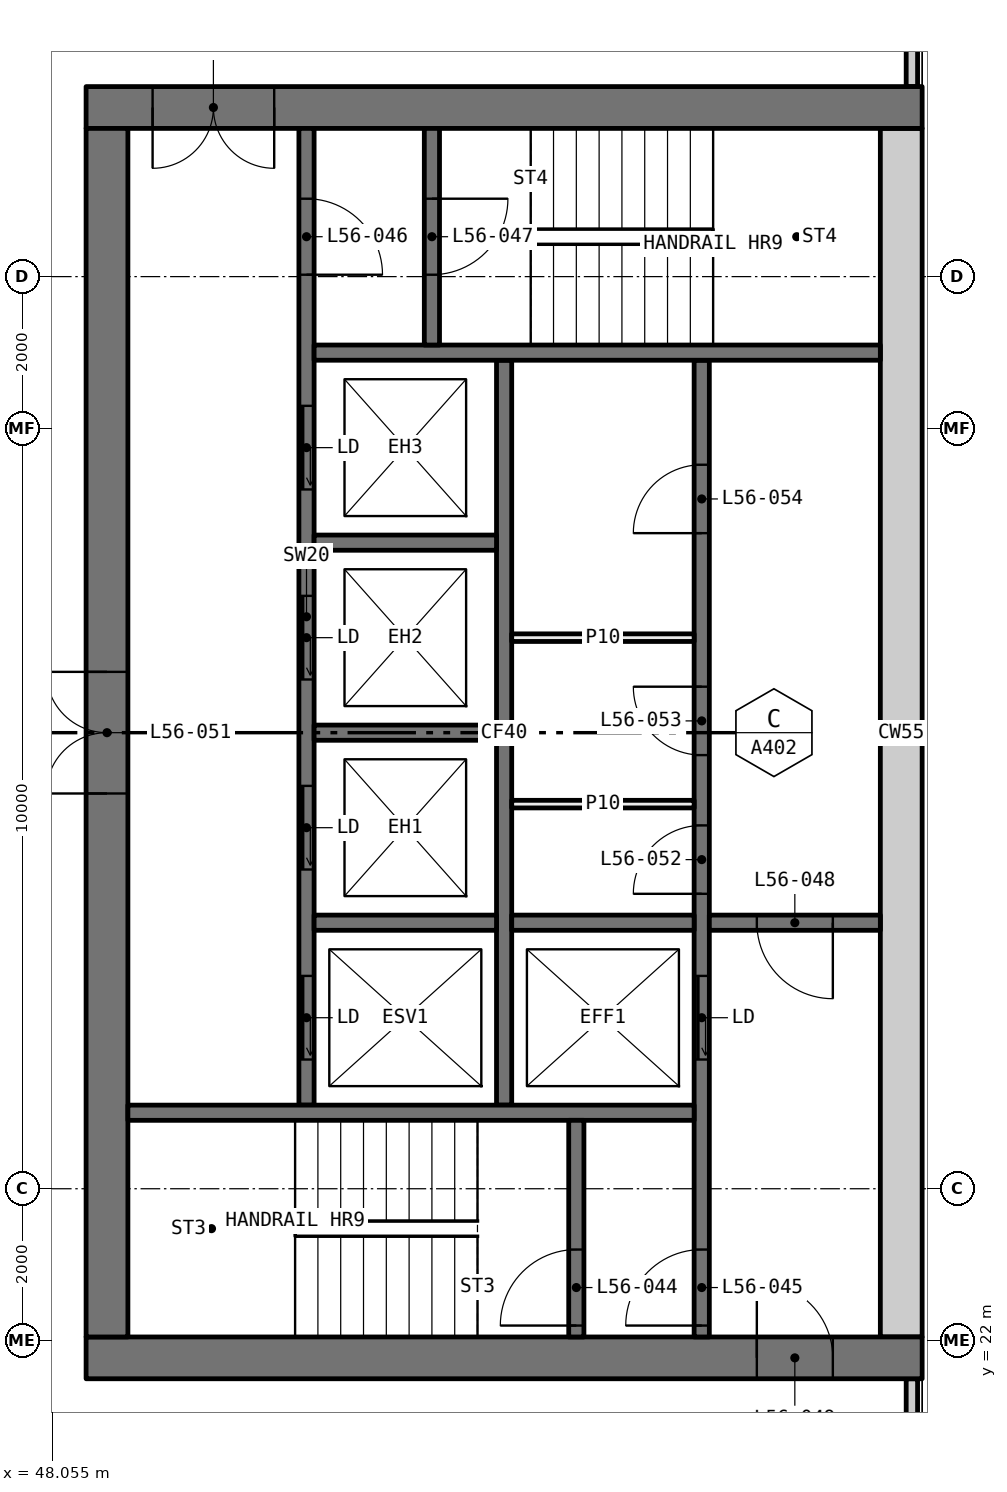
"""IFC4 building model, lengths in metres.
Left out: names, types, materials, properties, quantities, classifications, styles, units other than length and angle.
Written with IfcOpenShell. Run it as: python <this file> out.ifc"""

import sys

from ifc_helpers import new_model, si_unit, direction, frame, frame_2d, origin, place, context, subcontext, project, spatial, rectangle, extrude, element, fill, save


model = new_model("IFC4")
c1 = context("Model", 3, precision=1e-05, world=origin(), true_north=direction((0.0, 1.0)))
c2 = subcontext(c1, "Body", "Model", "MODEL_VIEW")
j1 = project(units=[si_unit("LENGTHUNIT", "METRE"), si_unit("PLANEANGLEUNIT", "RADIAN")], contexts=[c1])
p1 = place(None, origin())
s1 = spatial("IfcSite", under=j1, at=p1, CompositionType="ELEMENT")
p2 = place(p1, origin())
s2 = spatial("IfcBuilding", under=s1, at=p2, CompositionType="ELEMENT")
p3 = place(p2, frame((0.0, 0.0, 210.0)))
s3 = spatial("IfcBuildingStorey", under=s2, at=p3, CompositionType="ELEMENT", Elevation=210.0)
for number, where, z_axis, x_axis in (
    (1, (59.365, 18.71, 0.0), (0.0, 0.0, 1.0), (0.0, 1.0, 0.0)),
    (2, (59.365, 38.5, 0.0), (0.0, 0.0, 1.0), (0.0, 1.0, 0.0)),
):
    element("IfcWall", number, at=place(p3, frame(where, z_axis=z_axis, x_axis=x_axis)), inside=s3, PredefinedType="ELEMENTEDWALL", context=c2, shape_type="SweptSolid", body=[
        extrude(rectangle(XDim=2.79, YDim=0.15, at=frame_2d((1.395, 0.0))), origin(), (0.0, 0.0, 1.0), 3.05),
    ])
p4 = place(p3, frame((59.5, 21.775, 0.0), z_axis=(0.0, 0.0, 1.0), x_axis=(-1.0, 0.0, 0.0)))
e3 = element("IfcWall", 3, at=p4, inside=s3, PredefinedType="SHEAR", context=c2, shape_type="SweptSolid", body=[
    extrude(rectangle(XDim=11.0, YDim=0.55, at=frame_2d((5.5, 0.0))), origin(), (0.0, 0.0, 1.0), 3.05),
])
p5 = place(p4, frame((1.175, 0.0, 0.0)))
e4 = element("IfcOpeningElement", 4, at=p5, cuts=e3, PredefinedType="OPENING", context=c2, shape_type="SweptSolid", body=[
    extrude(rectangle(XDim=1.0, YDim=2.1, at=frame_2d((0.5, 1.05))), frame((0.0, 0.285, 0.0), z_axis=(0.0, -1.0, 0.0), x_axis=(1.0, 0.0, 0.0)), (0.0, 0.0, 1.0), 0.57),
])
p6 = place(p3, frame((59.5, 38.225, 0.0), z_axis=(0.0, 0.0, 1.0), x_axis=(-1.0, 0.0, 0.0)))
e5 = element("IfcWall", 5, at=p6, inside=s3, PredefinedType="SHEAR", context=c2, shape_type="SweptSolid", body=[
    extrude(rectangle(XDim=11.0, YDim=0.55, at=frame_2d((5.5, 0.0))), origin(), (0.0, 0.0, 1.0), 3.05),
])
p7 = place(p6, frame((8.525, 0.0, 0.0)))
e6 = element("IfcOpeningElement", 6, at=p7, cuts=e5, PredefinedType="OPENING", context=c2, shape_type="SweptSolid", body=[
    extrude(rectangle(XDim=1.6, YDim=2.1, at=frame_2d((0.8, 1.05))), frame((0.0, 0.285, 0.0), z_axis=(0.0, -1.0, 0.0), x_axis=(1.0, 0.0, 0.0)), (0.0, 0.0, 1.0), 0.57),
])
p8 = place(p3, frame((59.225, 22.05, 0.0), z_axis=(0.0, 0.0, 1.0), x_axis=(0.0, 1.0, 0.0)))
e7 = element("IfcWall", 7, at=p8, inside=s3, PredefinedType="SHEAR", context=c2, shape_type="SweptSolid", body=[
    extrude(rectangle(XDim=15.9, YDim=0.55, at=frame_2d((7.95, 0.0))), origin(), (0.0, 0.0, 1.0), 3.05),
])
p9 = place(p3, frame((48.775, 22.05, 0.0), z_axis=(0.0, 0.0, 1.0), x_axis=(0.0, 1.0, 0.0)))
e8 = element("IfcWall", 8, at=p9, inside=s3, PredefinedType="SHEAR", context=c2, shape_type="SweptSolid", body=[
    extrude(rectangle(XDim=15.9, YDim=0.55, at=frame_2d((7.95, 0.0))), origin(), (0.0, 0.0, 1.0), 3.05),
])
p10 = place(p9, frame((7.15, 0.0, 0.0)))
e9 = element("IfcOpeningElement", 9, at=p10, cuts=e8, PredefinedType="OPENING", context=c2, shape_type="SweptSolid", body=[
    extrude(rectangle(XDim=1.6, YDim=2.1, at=frame_2d((0.8, 1.05))), frame((0.0, 0.285, 0.0), z_axis=(0.0, -1.0, 0.0), x_axis=(1.0, 0.0, 0.0)), (0.0, 0.0, 1.0), 0.57),
])
p11 = place(p3, frame((56.6, 22.05, 0.0), z_axis=(0.0, 0.0, 1.0), x_axis=(0.0, 1.0, 0.0)))
e10 = element("IfcWall", 10, at=p11, inside=s3, PredefinedType="SOLIDWALL", context=c2, shape_type="SweptSolid", body=[
    extrude(rectangle(XDim=12.85, YDim=0.2, at=frame_2d((6.425, 0.0))), origin(), (0.0, 0.0, 1.0), 3.05),
])
p12 = place(p11, frame((3.65, 0.0, 0.0)))
e11 = element("IfcOpeningElement", 11, at=p12, cuts=e10, PredefinedType="OPENING", context=c2, shape_type="SweptSolid", body=[
    extrude(rectangle(XDim=1.1, YDim=2.1, at=frame_2d((0.55, 1.05))), frame((0.0, 0.11, 0.0), z_axis=(0.0, -1.0, 0.0), x_axis=(1.0, 0.0, 0.0)), (0.0, 0.0, 1.0), 0.22),
])
p13 = place(p11, frame((0.15, 0.0, 0.0)))
e12 = element("IfcOpeningElement", 12, at=p13, cuts=e10, PredefinedType="OPENING", context=c2, shape_type="SweptSolid", body=[
    extrude(rectangle(XDim=1.0, YDim=2.1, at=frame_2d((0.5, 1.05))), frame((0.0, 0.11, 0.0), z_axis=(0.0, -1.0, 0.0), x_axis=(1.0, 0.0, 0.0)), (0.0, 0.0, 1.0), 0.22),
])
p14 = place(p11, frame((5.83, 0.0, 0.0)))
e13 = element("IfcOpeningElement", 13, at=p14, cuts=e10, PredefinedType="OPENING", context=c2, shape_type="SweptSolid", body=[
    extrude(rectangle(XDim=0.9, YDim=2.1, at=frame_2d((0.45, 1.05))), frame((0.0, 0.11, 0.0), z_axis=(0.0, -1.0, 0.0), x_axis=(1.0, 0.0, 0.0)), (0.0, 0.0, 1.0), 0.22),
])
p15 = place(p11, frame((7.655, 0.0, 0.0)))
e14 = element("IfcOpeningElement", 14, at=p15, cuts=e10, PredefinedType="OPENING", context=c2, shape_type="SweptSolid", body=[
    extrude(rectangle(XDim=0.9, YDim=2.1, at=frame_2d((0.45, 1.05))), frame((0.0, 0.11, 0.0), z_axis=(0.0, -1.0, 0.0), x_axis=(1.0, 0.0, 0.0)), (0.0, 0.0, 1.0), 0.22),
])
p16 = place(p11, frame((10.575, 0.0, 0.0)))
e15 = element("IfcOpeningElement", 15, at=p16, cuts=e10, PredefinedType="OPENING", context=c2, shape_type="SweptSolid", body=[
    extrude(rectangle(XDim=0.9, YDim=2.1, at=frame_2d((0.45, 1.05))), frame((0.0, 0.11, 0.0), z_axis=(0.0, -1.0, 0.0), x_axis=(1.0, 0.0, 0.0)), (0.0, 0.0, 1.0), 0.22),
])
p17 = place(p3, frame((51.4, 25.1, 0.0), z_axis=(0.0, 0.0, 1.0), x_axis=(0.0, 1.0, 0.0)))
e16 = element("IfcWall", 16, at=p17, inside=s3, PredefinedType="SOLIDWALL", context=c2, shape_type="SweptSolid", body=[
    extrude(rectangle(XDim=12.85, YDim=0.2, at=frame_2d((6.425, 0.0))), origin(), (0.0, 0.0, 1.0), 3.05),
])
p18 = place(p17, frame((0.6, 0.0, 0.0)))
e17 = element("IfcOpeningElement", 17, at=p18, cuts=e16, PredefinedType="OPENING", context=c2, shape_type="SweptSolid", body=[
    extrude(rectangle(XDim=1.1, YDim=2.1, at=frame_2d((0.55, 1.05))), frame((0.0, 0.11, 0.0), z_axis=(0.0, -1.0, 0.0), x_axis=(1.0, 0.0, 0.0)), (0.0, 0.0, 1.0), 0.22),
])
p19 = place(p17, frame((3.1, 0.0, 0.0)))
e18 = element("IfcOpeningElement", 18, at=p19, cuts=e16, PredefinedType="OPENING", context=c2, shape_type="SweptSolid", body=[
    extrude(rectangle(XDim=1.1, YDim=2.1, at=frame_2d((0.55, 1.05))), frame((0.0, 0.11, 0.0), z_axis=(0.0, -1.0, 0.0), x_axis=(1.0, 0.0, 0.0)), (0.0, 0.0, 1.0), 0.22),
])
p20 = place(p17, frame((5.6, 0.0, 0.0)))
e19 = element("IfcOpeningElement", 19, at=p20, cuts=e16, PredefinedType="OPENING", context=c2, shape_type="SweptSolid", body=[
    extrude(rectangle(XDim=1.1, YDim=2.1, at=frame_2d((0.55, 1.05))), frame((0.0, 0.11, 0.0), z_axis=(0.0, -1.0, 0.0), x_axis=(1.0, 0.0, 0.0)), (0.0, 0.0, 1.0), 0.22),
])
p21 = place(p17, frame((8.1, 0.0, 0.0)))
e20 = element("IfcOpeningElement", 20, at=p21, cuts=e16, PredefinedType="OPENING", context=c2, shape_type="SweptSolid", body=[
    extrude(rectangle(XDim=1.1, YDim=2.1, at=frame_2d((0.55, 1.05))), frame((0.0, 0.11, 0.0), z_axis=(0.0, -1.0, 0.0), x_axis=(1.0, 0.0, 0.0)), (0.0, 0.0, 1.0), 0.22),
])
p22 = place(p17, frame((10.925, 0.0, 0.0)))
e21 = element("IfcOpeningElement", 21, at=p22, cuts=e16, PredefinedType="OPENING", context=c2, shape_type="SweptSolid", body=[
    extrude(rectangle(XDim=1.0, YDim=2.1, at=frame_2d((0.5, 1.05))), frame((0.0, 0.11, 0.0), z_axis=(0.0, -1.0, 0.0), x_axis=(1.0, 0.0, 0.0)), (0.0, 0.0, 1.0), 0.22),
])
p23 = place(p3, frame((54.0, 25.1, 0.0), z_axis=(0.0, 0.0, 1.0), x_axis=(0.0, 1.0, 0.0)))
e22 = element("IfcWall", 22, at=p23, inside=s3, PredefinedType="SOLIDWALL", context=c2, shape_type="SweptSolid", body=[
    extrude(rectangle(XDim=9.8, YDim=0.2, at=frame_2d((4.9, 0.0))), origin(), (0.0, 0.0, 1.0), 3.05),
])
for number, where, z_axis, x_axis in (
    (23, (56.5, 25.0, 0.0), (0.0, 0.0, 1.0), (-1.0, 0.0, 0.0)),
    (24, (58.95, 35.0, 0.0), (0.0, 0.0, 1.0), (-1.0, 0.0, 0.0)),
):
    element("IfcWall", number, at=place(p3, frame(where, z_axis=z_axis, x_axis=x_axis)), inside=s3, PredefinedType="SOLIDWALL", context=c2, shape_type="SweptSolid", body=[
        extrude(rectangle(XDim=7.45, YDim=0.2, at=frame_2d((3.725, 0.0))), origin(), (0.0, 0.0, 1.0), 3.05),
    ])
p24 = place(p3, frame((58.95, 27.5, 0.0), z_axis=(0.0, 0.0, 1.0), x_axis=(-1.0, 0.0, 0.0)))
e25 = element("IfcWall", 25, at=p24, inside=s3, PredefinedType="SOLIDWALL", context=c2, shape_type="SweptSolid", body=[
    extrude(rectangle(XDim=2.25, YDim=0.2, at=frame_2d((1.125, 0.0))), origin(), (0.0, 0.0, 1.0), 3.05),
])
p25 = place(p24, frame((0.625, 0.0, 0.0)))
e26 = element("IfcOpeningElement", 26, at=p25, cuts=e25, PredefinedType="OPENING", context=c2, shape_type="SweptSolid", body=[
    extrude(rectangle(XDim=1.0, YDim=2.1, at=frame_2d((0.5, 1.05))), frame((0.0, 0.11, 0.0), z_axis=(0.0, -1.0, 0.0), x_axis=(1.0, 0.0, 0.0)), (0.0, 0.0, 1.0), 0.22),
])
p26 = place(p3, frame((54.95, 22.05, 0.0), z_axis=(0.0, 0.0, 1.0), x_axis=(0.0, 1.0, 0.0)))
e27 = element("IfcWall", 27, at=p26, inside=s3, PredefinedType="SOLIDWALL", context=c2, shape_type="SweptSolid", body=[
    extrude(rectangle(XDim=2.85, YDim=0.2, at=frame_2d((1.425, 0.0))), origin(), (0.0, 0.0, 1.0), 3.05),
])
p27 = place(p26, frame((0.15, 0.0, 0.0)))
e28 = element("IfcOpeningElement", 28, at=p27, cuts=e27, PredefinedType="OPENING", context=c2, shape_type="SweptSolid", body=[
    extrude(rectangle(XDim=1.0, YDim=2.1, at=frame_2d((0.5, 1.05))), frame((0.0, 0.11, 0.0), z_axis=(0.0, -1.0, 0.0), x_axis=(1.0, 0.0, 0.0)), (0.0, 0.0, 1.0), 0.22),
])
p28 = place(p3, frame((53.05, 35.1, 0.0), z_axis=(0.0, 0.0, 1.0), x_axis=(0.0, 1.0, 0.0)))
e29 = element("IfcWall", 29, at=p28, inside=s3, PredefinedType="SOLIDWALL", context=c2, shape_type="SweptSolid", body=[
    extrude(rectangle(XDim=2.85, YDim=0.2, at=frame_2d((1.425, 0.0))), origin(), (0.0, 0.0, 1.0), 3.05),
])
p29 = place(p28, frame((0.925, 0.0, 0.0)))
e30 = element("IfcOpeningElement", 30, at=p29, cuts=e29, PredefinedType="OPENING", context=c2, shape_type="SweptSolid", body=[
    extrude(rectangle(XDim=1.0, YDim=2.1, at=frame_2d((0.5, 1.05))), frame((0.0, 0.11, 0.0), z_axis=(0.0, -1.0, 0.0), x_axis=(1.0, 0.0, 0.0)), (0.0, 0.0, 1.0), 0.22),
])
for number, where, z_axis, x_axis in (
    (31, (56.5, 27.5, 0.0), (0.0, 0.0, 1.0), (-1.0, 0.0, 0.0)),
    (32, (53.9, 27.5, 0.0), (0.0, 0.0, 1.0), (-1.0, 0.0, 0.0)),
    (33, (53.9, 30.0, 0.0), (0.0, 0.0, 1.0), (-1.0, 0.0, 0.0)),
    (34, (53.9, 32.5, 0.0), (0.0, 0.0, 1.0), (-1.0, 0.0, 0.0)),
):
    element("IfcWall", number, at=place(p3, frame(where, z_axis=z_axis, x_axis=x_axis)), inside=s3, PredefinedType="SOLIDWALL", context=c2, shape_type="SweptSolid", body=[
        extrude(rectangle(XDim=2.4, YDim=0.2, at=frame_2d((1.2, 0.0))), origin(), (0.0, 0.0, 1.0), 3.05),
    ])
for number, where, z_axis, x_axis in (
    (35, (56.5, 29.06, 0.0), (0.0, 0.0, 1.0), (-1.0, 0.0, 0.0)),
    (36, (56.5, 31.25, 0.0), (0.0, 0.0, 1.0), (-1.0, 0.0, 0.0)),
):
    element("IfcWall", number, at=place(p3, frame(where, z_axis=z_axis, x_axis=x_axis)), inside=s3, PredefinedType="PARTITIONING", context=c2, shape_type="SweptSolid", body=[
        extrude(rectangle(XDim=2.4, YDim=0.1, at=frame_2d((1.2, 0.0))), origin(), (0.0, 0.0, 1.0), 3.05),
    ])
p30 = place(p18, origin())
e37 = element("IfcDoor", 37, at=p30, inside=s3, OperationType="SLIDING_TO_LEFT", PredefinedType="DOOR", context=c2, shape_type="SweptSolid", body=[
    extrude(rectangle(XDim=1.1, YDim=2.1, at=frame_2d((0.55, 1.05))), frame((0.0, 0.025, 0.0), z_axis=(0.0, -1.0, 0.0), x_axis=(1.0, 0.0, 0.0)), (0.0, 0.0, 1.0), 0.05),
])
fill(e17, e37)
p31 = place(p19, origin())
e38 = element("IfcDoor", 38, at=p31, inside=s3, OperationType="SLIDING_TO_LEFT", PredefinedType="DOOR", context=c2, shape_type="SweptSolid", body=[
    extrude(rectangle(XDim=1.1, YDim=2.1, at=frame_2d((0.55, 1.05))), frame((0.0, 0.025, 0.0), z_axis=(0.0, -1.0, 0.0), x_axis=(1.0, 0.0, 0.0)), (0.0, 0.0, 1.0), 0.05),
])
fill(e18, e38)
p32 = place(p20, origin())
e39 = element("IfcDoor", 39, at=p32, inside=s3, OperationType="SLIDING_TO_LEFT", PredefinedType="DOOR", context=c2, shape_type="SweptSolid", body=[
    extrude(rectangle(XDim=1.1, YDim=2.1, at=frame_2d((0.55, 1.05))), frame((0.0, 0.025, 0.0), z_axis=(0.0, -1.0, 0.0), x_axis=(1.0, 0.0, 0.0)), (0.0, 0.0, 1.0), 0.05),
])
fill(e19, e39)
p33 = place(p21, origin())
e40 = element("IfcDoor", 40, at=p33, inside=s3, OperationType="SLIDING_TO_LEFT", PredefinedType="DOOR", context=c2, shape_type="SweptSolid", body=[
    extrude(rectangle(XDim=1.1, YDim=2.1, at=frame_2d((0.55, 1.05))), frame((0.0, 0.025, 0.0), z_axis=(0.0, -1.0, 0.0), x_axis=(1.0, 0.0, 0.0)), (0.0, 0.0, 1.0), 0.05),
])
fill(e20, e40)
p34 = place(p12, origin())
e41 = element("IfcDoor", 41, at=p34, inside=s3, OperationType="SLIDING_TO_LEFT", PredefinedType="DOOR", context=c2, shape_type="SweptSolid", body=[
    extrude(rectangle(XDim=1.1, YDim=2.1, at=frame_2d((0.55, 1.05))), frame((0.0, 0.025, 0.0), z_axis=(0.0, -1.0, 0.0), x_axis=(1.0, 0.0, 0.0)), (0.0, 0.0, 1.0), 0.05),
])
fill(e11, e41)
p35 = place(p27, origin())
e42 = element("IfcDoor", 42, at=p35, inside=s3, OperationType="SINGLE_SWING_RIGHT", PredefinedType="DOOR", context=c2, shape_type="SweptSolid", body=[
    extrude(rectangle(XDim=1.0, YDim=2.1, at=frame_2d((0.5, 1.05))), frame((0.0, 0.025, 0.0), z_axis=(0.0, -1.0, 0.0), x_axis=(1.0, 0.0, 0.0)), (0.0, 0.0, 1.0), 0.05),
])
fill(e28, e42)
p36 = place(p13, origin())
e43 = element("IfcDoor", 43, at=p36, inside=s3, OperationType="SINGLE_SWING_RIGHT", PredefinedType="DOOR", context=c2, shape_type="SweptSolid", body=[
    extrude(rectangle(XDim=1.0, YDim=2.1, at=frame_2d((0.5, 1.05))), frame((0.0, 0.025, 0.0), z_axis=(0.0, -1.0, 0.0), x_axis=(1.0, 0.0, 0.0)), (0.0, 0.0, 1.0), 0.05),
])
fill(e12, e43)
p37 = place(p22, frame((1.0, 0.0, 0.0), x_axis=(-1.0, 0.0, 0.0)))
e44 = element("IfcDoor", 44, at=p37, inside=s3, OperationType="SINGLE_SWING_LEFT", PredefinedType="DOOR", context=c2, shape_type="SweptSolid", body=[
    extrude(rectangle(XDim=1.0, YDim=2.1, at=frame_2d((0.5, 1.05))), frame((0.0, 0.025, 0.0), z_axis=(0.0, -1.0, 0.0), x_axis=(1.0, 0.0, 0.0)), (0.0, 0.0, 1.0), 0.05),
])
fill(e21, e44)
p38 = place(p29, frame((1.0, 0.0, 0.0), x_axis=(-1.0, 0.0, 0.0)))
e45 = element("IfcDoor", 45, at=p38, inside=s3, OperationType="SINGLE_SWING_RIGHT", PredefinedType="DOOR", context=c2, shape_type="SweptSolid", body=[
    extrude(rectangle(XDim=1.0, YDim=2.1, at=frame_2d((0.5, 1.05))), frame((0.0, 0.025, 0.0), z_axis=(0.0, -1.0, 0.0), x_axis=(1.0, 0.0, 0.0)), (0.0, 0.0, 1.0), 0.05),
])
fill(e30, e45)
p39 = place(p25, origin())
e46 = element("IfcDoor", 46, at=p39, inside=s3, OperationType="SINGLE_SWING_RIGHT", PredefinedType="DOOR", context=c2, shape_type="SweptSolid", body=[
    extrude(rectangle(XDim=1.0, YDim=2.1, at=frame_2d((0.5, 1.05))), frame((0.0, 0.025, 0.0), z_axis=(0.0, -1.0, 0.0), x_axis=(1.0, 0.0, 0.0)), (0.0, 0.0, 1.0), 0.05),
])
fill(e26, e46)
p40 = place(p5, frame((1.0, 0.0, 0.0), x_axis=(-1.0, 0.0, 0.0)))
e47 = element("IfcDoor", 47, at=p40, inside=s3, OperationType="SINGLE_SWING_RIGHT", PredefinedType="DOOR", context=c2, shape_type="SweptSolid", body=[
    extrude(rectangle(XDim=1.0, YDim=2.1, at=frame_2d((0.5, 1.05))), frame((0.0, 0.025, 0.0), z_axis=(0.0, -1.0, 0.0), x_axis=(1.0, 0.0, 0.0)), (0.0, 0.0, 1.0), 0.05),
])
fill(e4, e47)
p41 = place(p7, origin())
e48 = element("IfcDoor", 48, at=p41, inside=s3, OperationType="DOUBLE_DOOR_SINGLE_SWING", PredefinedType="DOOR", context=c2, shape_type="SweptSolid", body=[
    extrude(rectangle(XDim=1.6, YDim=2.1, at=frame_2d((0.8, 1.05))), frame((0.0, 0.025, 0.0), z_axis=(0.0, -1.0, 0.0), x_axis=(1.0, 0.0, 0.0)), (0.0, 0.0, 1.0), 0.05),
])
fill(e6, e48)
p42 = place(p10, origin())
e49 = element("IfcDoor", 49, at=p42, inside=s3, OperationType="DOUBLE_DOOR_SINGLE_SWING", PredefinedType="DOOR", context=c2, shape_type="SweptSolid", body=[
    extrude(rectangle(XDim=1.6, YDim=2.1, at=frame_2d((0.8, 1.05))), frame((0.0, 0.025, 0.0), z_axis=(0.0, -1.0, 0.0), x_axis=(1.0, 0.0, 0.0)), (0.0, 0.0, 1.0), 0.05),
])
fill(e9, e49)
p43 = place(p14, origin())
e50 = element("IfcDoor", 50, at=p43, inside=s3, OperationType="SINGLE_SWING_RIGHT", PredefinedType="DOOR", context=c2, shape_type="SweptSolid", body=[
    extrude(rectangle(XDim=0.9, YDim=2.1, at=frame_2d((0.45, 1.05))), frame((0.0, 0.025, 0.0), z_axis=(0.0, -1.0, 0.0), x_axis=(1.0, 0.0, 0.0)), (0.0, 0.0, 1.0), 0.05),
])
fill(e13, e50)
p44 = place(p15, origin())
e51 = element("IfcDoor", 51, at=p44, inside=s3, OperationType="SINGLE_SWING_LEFT", PredefinedType="DOOR", context=c2, shape_type="SweptSolid", body=[
    extrude(rectangle(XDim=0.9, YDim=2.1, at=frame_2d((0.45, 1.05))), frame((0.0, 0.025, 0.0), z_axis=(0.0, -1.0, 0.0), x_axis=(1.0, 0.0, 0.0)), (0.0, 0.0, 1.0), 0.05),
])
fill(e14, e51)
p45 = place(p16, origin())
e52 = element("IfcDoor", 52, at=p45, inside=s3, OperationType="SINGLE_SWING_RIGHT", PredefinedType="DOOR", context=c2, shape_type="SweptSolid", body=[
    extrude(rectangle(XDim=0.9, YDim=2.1, at=frame_2d((0.45, 1.05))), frame((0.0, 0.025, 0.0), z_axis=(0.0, -1.0, 0.0), x_axis=(1.0, 0.0, 0.0)), (0.0, 0.0, 1.0), 0.05),
])
fill(e15, e52)
save(model, sys.argv[1])
